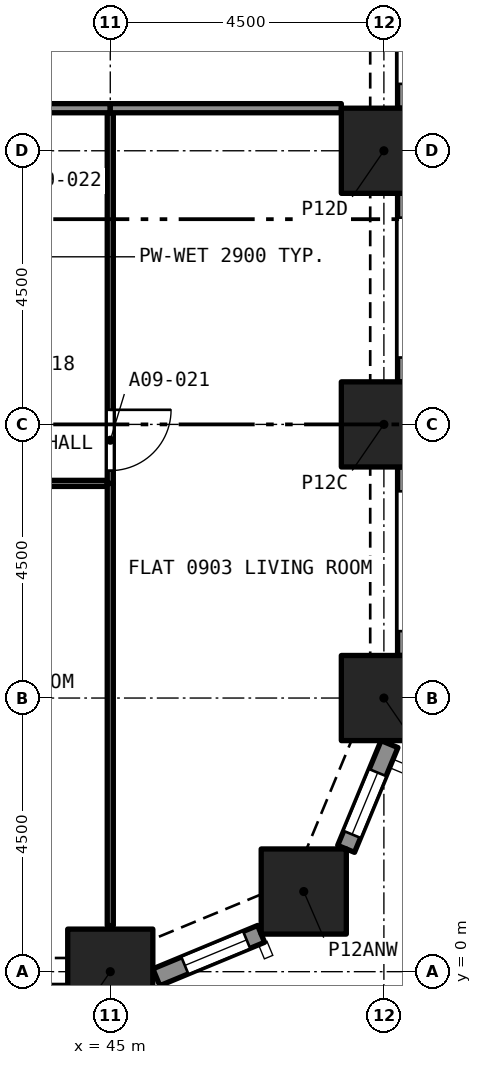
"""IFC4 building model, lengths in metres.
Left out: names, types, materials, properties, quantities, classifications, styles, units other than length and angle.
Written with IfcOpenShell. Run it as: python <this file> out.ifc"""

import sys

from ifc_helpers import new_model, si_unit, direction, frame, frame_2d, origin, origin_2d, place, context, subcontext, project, spatial, rectangle, extrude, element, fill, save


model = new_model("IFC4")
c1 = context("Model", 3, precision=1e-05, world=origin(), true_north=direction((0.0, 1.0)))
c2 = subcontext(c1, "Body", "Model", "MODEL_VIEW")
j1 = project(units=[si_unit("LENGTHUNIT", "METRE"), si_unit("PLANEANGLEUNIT", "RADIAN")], contexts=[c1])
p1 = place(None, origin())
s1 = spatial("IfcSite", under=j1, at=p1, CompositionType="ELEMENT")
p2 = place(p1, origin())
s2 = spatial("IfcBuilding", under=s1, at=p2, CompositionType="ELEMENT")
p3 = place(p2, frame((0.0, 0.0, 40.0)))
s3 = spatial("IfcBuildingStorey", under=s2, at=p3, CompositionType="ELEMENT", Elevation=40.0)
for number, where, z_axis, x_axis in (
    (1, (45.0, 0.0, 0.0), (0.0, 0.0, 1.0), (1.0, 0.0, 0.0)),
    (2, (48.182, 1.318, 0.0), (0.0, 0.0, 1.0), (1.0, 0.0, 0.0)),
    (3, (49.5, 4.5, 0.0), (0.0, 0.0, 1.0), (1.0, 0.0, 0.0)),
    (4, (49.5, 9.0, 0.0), (0.0, 0.0, 1.0), (1.0, 0.0, 0.0)),
    (5, (49.5, 13.5, 0.0), (0.0, 0.0, 1.0), (1.0, 0.0, 0.0)),
):
    element("IfcColumn", number, at=place(p3, frame(where, z_axis=z_axis, x_axis=x_axis)), inside=s3, PredefinedType="COLUMN", context=c2, shape_type="SweptSolid", body=[
        extrude(rectangle(XDim=1.4, YDim=1.4, at=origin_2d()), origin(), (0.0, 0.0, 1.0), 3.2),
    ])
p4 = place(p3, frame((47.48, 0.622, 0.0), z_axis=(0.0, 0.0, 1.0), x_axis=(-0.923903565336, -0.38262540684, 0.0)))
e6 = element("IfcWall", 6, at=p4, inside=s3, PredefinedType="SOLIDWALL", context=c2, shape_type="SweptSolid", body=[
    extrude(rectangle(XDim=1.865, YDim=0.3, at=frame_2d((0.933, 0.0))), origin(), (0.0, 0.0, 1.0), 3.2),
])
p5 = place(p4, frame((0.258, 0.0, 0.45)))
e7 = element("IfcOpeningElement", 7, at=p5, cuts=e6, PredefinedType="OPENING", context=c2, shape_type="SweptSolid", body=[
    extrude(rectangle(XDim=1.1, YDim=1.95, at=frame_2d((0.55, 0.975))), frame((0.0, 0.16, 0.0), z_axis=(0.0, -1.0, 0.0), x_axis=(1.0, 0.0, 0.0)), (0.0, 0.0, 1.0), 0.32),
])
p6 = place(p3, frame((49.592, 3.743, 0.0), z_axis=(0.0, 0.0, 1.0), x_axis=(-0.382737135771, -0.923857286003, 0.0)))
e8 = element("IfcWall", 8, at=p6, inside=s3, PredefinedType="SOLIDWALL", context=c2, shape_type="SweptSolid", body=[
    extrude(rectangle(XDim=1.865, YDim=0.3, at=frame_2d((0.933, 0.0))), origin(), (0.0, 0.0, 1.0), 3.2),
])
p7 = place(p6, frame((0.508, 0.0, 0.45)))
e9 = element("IfcOpeningElement", 9, at=p7, cuts=e8, PredefinedType="OPENING", context=c2, shape_type="SweptSolid", body=[
    extrude(rectangle(XDim=1.1, YDim=1.95, at=frame_2d((0.55, 0.975))), frame((0.0, 0.16, 0.0), z_axis=(0.0, -1.0, 0.0), x_axis=(1.0, 0.0, 0.0)), (0.0, 0.0, 1.0), 0.32),
])
p8 = place(p3, frame((49.875, 8.3, 0.0), z_axis=(0.0, 0.0, 1.0), x_axis=(0.0, -1.0, 0.0)))
e10 = element("IfcWall", 10, at=p8, inside=s3, PredefinedType="SOLIDWALL", context=c2, shape_type="SweptSolid", body=[
    extrude(rectangle(XDim=3.1, YDim=0.3, at=frame_2d((1.55, 0.0))), origin(), (0.0, 0.0, 1.0), 3.2),
])
p9 = place(p8, frame((0.4, 0.0, 0.45)))
e11 = element("IfcOpeningElement", 11, at=p9, cuts=e10, PredefinedType="OPENING", context=c2, shape_type="SweptSolid", body=[
    extrude(rectangle(XDim=2.3, YDim=1.95, at=frame_2d((1.15, 0.975))), frame((0.0, 0.16, 0.0), z_axis=(0.0, -1.0, 0.0), x_axis=(1.0, 0.0, 0.0)), (0.0, 0.0, 1.0), 0.32),
])
p10 = place(p3, frame((49.875, 12.8, 0.0), z_axis=(0.0, 0.0, 1.0), x_axis=(0.0, -1.0, 0.0)))
e12 = element("IfcWall", 12, at=p10, inside=s3, PredefinedType="SOLIDWALL", context=c2, shape_type="SweptSolid", body=[
    extrude(rectangle(XDim=3.1, YDim=0.3, at=frame_2d((1.55, 0.0))), origin(), (0.0, 0.0, 1.0), 3.2),
])
p11 = place(p10, frame((0.4, 0.0, 0.45)))
e13 = element("IfcOpeningElement", 13, at=p11, cuts=e12, PredefinedType="OPENING", context=c2, shape_type="SweptSolid", body=[
    extrude(rectangle(XDim=2.3, YDim=1.95, at=frame_2d((1.15, 0.975))), frame((0.0, 0.16, 0.0), z_axis=(0.0, -1.0, 0.0), x_axis=(1.0, 0.0, 0.0)), (0.0, 0.0, 1.0), 0.32),
])
p12 = place(p3, frame((49.875, 17.3, 0.0), z_axis=(0.0, 0.0, 1.0), x_axis=(0.0, -1.0, 0.0)))
e14 = element("IfcWall", 14, at=p12, inside=s3, PredefinedType="SOLIDWALL", context=c2, shape_type="SweptSolid", body=[
    extrude(rectangle(XDim=3.1, YDim=0.3, at=frame_2d((1.55, 0.0))), origin(), (0.0, 0.0, 1.0), 3.2),
])
p13 = place(p12, frame((0.4, 0.0, 0.45)))
e15 = element("IfcOpeningElement", 15, at=p13, cuts=e14, PredefinedType="OPENING", context=c2, shape_type="SweptSolid", body=[
    extrude(rectangle(XDim=2.3, YDim=1.95, at=frame_2d((1.15, 0.975))), frame((0.0, 0.16, 0.0), z_axis=(0.0, -1.0, 0.0), x_axis=(1.0, 0.0, 0.0)), (0.0, 0.0, 1.0), 0.32),
])
p14 = place(p3, frame((44.95, 8.03, 0.0), z_axis=(0.0, 0.0, 1.0), x_axis=(-1.0, 0.0, 0.0)))
e16 = element("IfcWall", 16, at=p14, inside=s3, PredefinedType="PARTITIONING", context=c2, shape_type="SweptSolid", body=[
    extrude(rectangle(XDim=4.35, YDim=0.1, at=frame_2d((2.175, 0.0))), origin(), (0.0, 0.0, 1.0), 2.9),
])
p15 = place(p14, frame((1.75, 0.0, 0.0)))
e17 = element("IfcOpeningElement", 17, at=p15, cuts=e16, PredefinedType="OPENING", context=c2, shape_type="SweptSolid", body=[
    extrude(rectangle(XDim=0.9, YDim=2.1, at=frame_2d((0.45, 1.05))), frame((0.0, 0.06, 0.0), z_axis=(0.0, -1.0, 0.0), x_axis=(1.0, 0.0, 0.0)), (0.0, 0.0, 1.0), 0.12),
])
p16 = place(p3, frame((45.0, 0.758, 0.0), z_axis=(0.0, 0.0, 1.0), x_axis=(0.0, 1.0, 0.0)))
e18 = element("IfcWall", 18, at=p16, inside=s3, PredefinedType="PARTITIONING", context=c2, shape_type="SweptSolid", body=[
    extrude(rectangle(XDim=7.272, YDim=0.1, at=frame_2d((3.636, 0.0))), origin(), (0.0, 0.0, 1.0), 2.9),
])
p17 = place(p3, frame((45.0, 14.125, 0.0), z_axis=(0.0, 0.0, 1.0), x_axis=(0.0, -1.0, 0.0)))
e19 = element("IfcWall", 19, at=p17, inside=s3, PredefinedType="PARTITIONING", context=c2, shape_type="SweptSolid", body=[
    extrude(rectangle(XDim=6.095, YDim=0.1, at=frame_2d((3.047, 0.0))), origin(), (0.0, 0.0, 1.0), 2.9),
])
p18 = place(p17, frame((4.885, 0.0, 0.0)))
e20 = element("IfcOpeningElement", 20, at=p18, cuts=e19, PredefinedType="OPENING", context=c2, shape_type="SweptSolid", body=[
    extrude(rectangle(XDim=1.0, YDim=2.1, at=frame_2d((0.5, 1.05))), frame((0.0, 0.06, 0.0), z_axis=(0.0, -1.0, 0.0), x_axis=(1.0, 0.0, 0.0)), (0.0, 0.0, 1.0), 0.12),
])
p19 = place(p3, frame((45.0, 14.2, 0.0), z_axis=(0.0, 0.0, 1.0), x_axis=(-1.0, 0.0, 0.0)))
e21 = element("IfcWall", 21, at=p19, inside=s3, PredefinedType="PARTITIONING", context=c2, shape_type="SweptSolid", body=[
    extrude(rectangle(XDim=2.25, YDim=0.15, at=frame_2d((1.125, 0.0))), origin(), (0.0, 0.0, 1.0), 2.9),
])
p20 = place(p19, frame((1.0, 0.0, 0.0)))
e22 = element("IfcOpeningElement", 22, at=p20, cuts=e21, PredefinedType="OPENING", context=c2, shape_type="SweptSolid", body=[
    extrude(rectangle(XDim=1.0, YDim=2.1, at=frame_2d((0.5, 1.05))), frame((0.0, 0.085, 0.0), z_axis=(0.0, -1.0, 0.0), x_axis=(1.0, 0.0, 0.0)), (0.0, 0.0, 1.0), 0.17),
])
p21 = place(p3, frame((45.0, 14.2, 0.0), z_axis=(0.0, 0.0, 1.0), x_axis=(1.0, 0.0, 0.0)))
e23 = element("IfcWall", 23, at=p21, inside=s3, PredefinedType="PARTITIONING", context=c2, shape_type="SweptSolid", body=[
    extrude(rectangle(XDim=3.8, YDim=0.15, at=frame_2d((1.9, 0.0))), origin(), (0.0, 0.0, 1.0), 2.9),
])
p22 = place(p5, origin())
e24 = element("IfcWindow", 24, at=p22, inside=s3, PartitioningType="SINGLE_PANEL", PredefinedType="WINDOW", context=c2, shape_type="SweptSolid", body=[
    extrude(rectangle(XDim=1.1, YDim=1.95, at=frame_2d((0.55, 0.975))), frame((0.0, 0.03, 0.0), z_axis=(0.0, -1.0, 0.0), x_axis=(1.0, 0.0, 0.0)), (0.0, 0.0, 1.0), 0.06),
])
fill(e7, e24)
p23 = place(p7, origin())
e25 = element("IfcWindow", 25, at=p23, inside=s3, PartitioningType="SINGLE_PANEL", PredefinedType="WINDOW", context=c2, shape_type="SweptSolid", body=[
    extrude(rectangle(XDim=1.1, YDim=1.95, at=frame_2d((0.55, 0.975))), frame((0.0, 0.03, 0.0), z_axis=(0.0, -1.0, 0.0), x_axis=(1.0, 0.0, 0.0)), (0.0, 0.0, 1.0), 0.06),
])
fill(e9, e25)
p24 = place(p18, origin())
e26 = element("IfcDoor", 26, at=p24, inside=s3, OperationType="SINGLE_SWING_RIGHT", PredefinedType="DOOR", context=c2, shape_type="SweptSolid", body=[
    extrude(rectangle(XDim=1.0, YDim=2.1, at=frame_2d((0.5, 1.05))), frame((0.0, 0.025, 0.0), z_axis=(0.0, -1.0, 0.0), x_axis=(1.0, 0.0, 0.0)), (0.0, 0.0, 1.0), 0.05),
])
fill(e20, e26)
save(model, sys.argv[1])
